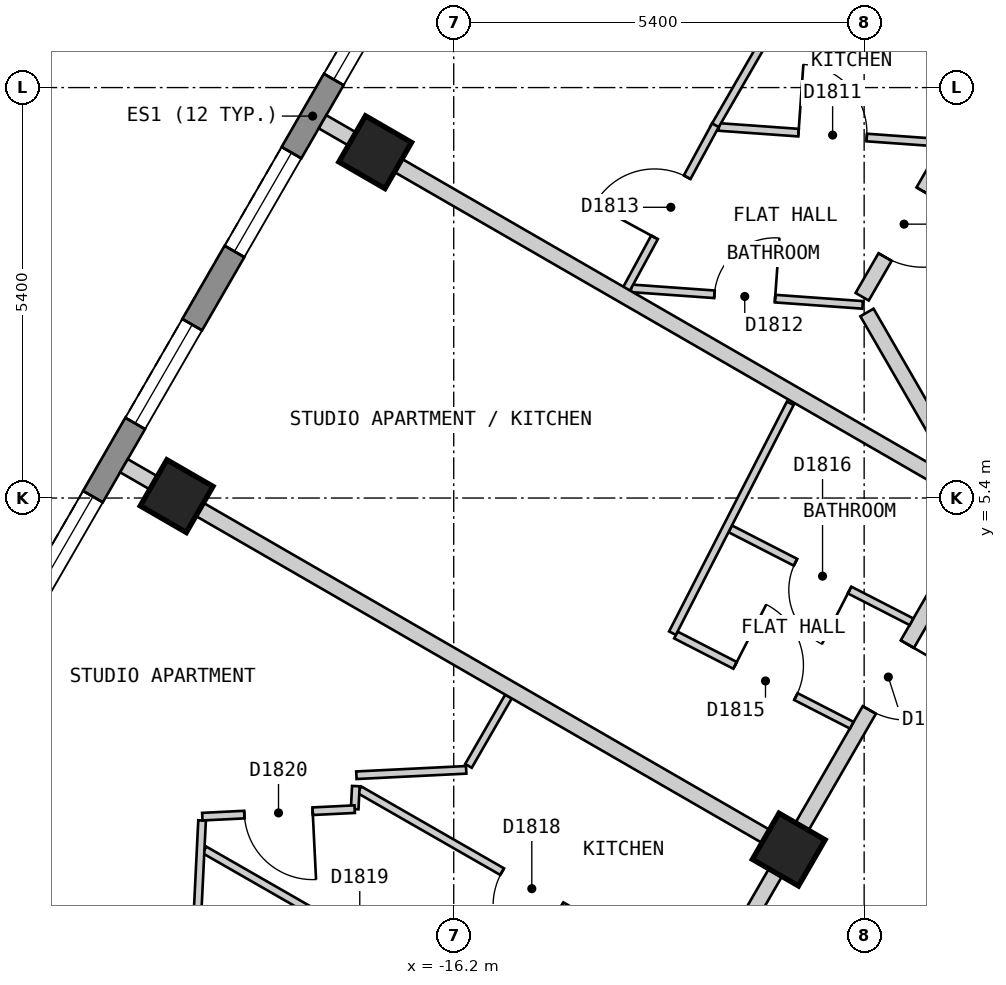
"""IFC4 building model, lengths in metres.
Left out: names, types, materials, properties, quantities, classifications, styles, units other than length and angle.
Written with IfcOpenShell. Run it as: python <this file> out.ifc"""

import sys

from ifc_helpers import new_model, si_unit, direction, frame, frame_2d, origin, origin_2d, place, context, subcontext, project, spatial, polyline, rectangle, outline, extrude, element, fill, save


model = new_model("IFC4")
c1 = context("Model", 3, precision=1e-05, world=origin(), true_north=direction((0.0, 1.0)))
c2 = subcontext(c1, "Body", "Model", "MODEL_VIEW")
j1 = project(units=[si_unit("LENGTHUNIT", "METRE"), si_unit("PLANEANGLEUNIT", "RADIAN")], contexts=[c1])
p1 = place(None, origin())
s1 = spatial("IfcSite", under=j1, at=p1, CompositionType="ELEMENT")
p2 = place(p1, origin())
s2 = spatial("IfcBuilding", under=s1, at=p2, CompositionType="ELEMENT")
p3 = place(p2, frame((0.0, 0.0, 208.8)))
s3 = spatial("IfcBuildingStorey", under=s2, at=p3, CompositionType="ELEMENT", Elevation=208.8)
for number, where, z_axis, x_axis in (
    (1, (-17.233, 9.95, 0.0), (0.0, 0.0, 1.0), (-0.5, -0.866, 0.0)),
    (2, (-19.846, 5.425, 0.0), (0.0, 0.0, 1.0), (-0.5, -0.866, 0.0)),
    (3, (-11.792, 0.775, 0.0), (0.0, 0.0, 1.0), (-0.5, -0.866, 0.0)),
):
    element("IfcColumn", number, at=place(p3, frame(where, z_axis=z_axis, x_axis=x_axis)), inside=s3, PredefinedType="COLUMN", context=c2, shape_type="SweptSolid", body=[
        extrude(rectangle(XDim=0.7, YDim=0.7, at=origin_2d()), origin(), (0.0, 0.0, 1.0), 3.0),
    ])
p4 = place(p3, frame((-12.514, 20.025, 0.0), z_axis=(0.0, 0.0, 1.0), x_axis=(-0.500003656944, -0.866023292436, 0.0)))
e4 = element("IfcWall", 4, at=p4, inside=s3, PredefinedType="SOLIDWALL", context=c2, shape_type="SweptSolid", body=[
    extrude(outline(polyline([(0.0, -0.15), (22.17, -0.15), (22.09, 0.15), (0.08, 0.15), (0.0, -0.15)])), origin(), (0.0, 0.0, 1.0), 2.7),
])
p5 = place(p4, frame((1.191, 0.0, 0.15)))
e5 = element("IfcOpeningElement", 5, at=p5, cuts=e4, PredefinedType="OPENING", context=c2, shape_type="SweptSolid", body=[
    extrude(rectangle(XDim=1.5, YDim=2.1, at=frame_2d((0.75, 1.05))), frame((0.0, 0.16, 0.0), z_axis=(0.0, -1.0, 0.0), x_axis=(1.0, 0.0, 0.0)), (0.0, 0.0, 1.0), 0.32),
])
p6 = place(p4, frame((3.804, 0.0, 0.15)))
e6 = element("IfcOpeningElement", 6, at=p6, cuts=e4, PredefinedType="OPENING", context=c2, shape_type="SweptSolid", body=[
    extrude(rectangle(XDim=1.5, YDim=2.1, at=frame_2d((0.75, 1.05))), frame((0.0, 0.16, 0.0), z_axis=(0.0, -1.0, 0.0), x_axis=(1.0, 0.0, 0.0)), (0.0, 0.0, 1.0), 0.32),
])
p7 = place(p4, frame((6.416, 0.0, 0.15)))
e7 = element("IfcOpeningElement", 7, at=p7, cuts=e4, PredefinedType="OPENING", context=c2, shape_type="SweptSolid", body=[
    extrude(rectangle(XDim=1.5, YDim=2.1, at=frame_2d((0.75, 1.05))), frame((0.0, 0.16, 0.0), z_axis=(0.0, -1.0, 0.0), x_axis=(1.0, 0.0, 0.0)), (0.0, 0.0, 1.0), 0.32),
])
p8 = place(p4, frame((9.029, 0.0, 0.15)))
e8 = element("IfcOpeningElement", 8, at=p8, cuts=e4, PredefinedType="OPENING", context=c2, shape_type="SweptSolid", body=[
    extrude(rectangle(XDim=1.5, YDim=2.1, at=frame_2d((0.75, 1.05))), frame((0.0, 0.16, 0.0), z_axis=(0.0, -1.0, 0.0), x_axis=(1.0, 0.0, 0.0)), (0.0, 0.0, 1.0), 0.32),
])
p9 = place(p4, frame((11.641, 0.0, 0.15)))
e9 = element("IfcOpeningElement", 9, at=p9, cuts=e4, PredefinedType="OPENING", context=c2, shape_type="SweptSolid", body=[
    extrude(rectangle(XDim=1.5, YDim=2.1, at=frame_2d((0.75, 1.05))), frame((0.0, 0.16, 0.0), z_axis=(0.0, -1.0, 0.0), x_axis=(1.0, 0.0, 0.0)), (0.0, 0.0, 1.0), 0.32),
])
p10 = place(p4, frame((14.254, 0.0, 0.15)))
e10 = element("IfcOpeningElement", 10, at=p10, cuts=e4, PredefinedType="OPENING", context=c2, shape_type="SweptSolid", body=[
    extrude(rectangle(XDim=1.5, YDim=2.1, at=frame_2d((0.75, 1.05))), frame((0.0, 0.16, 0.0), z_axis=(0.0, -1.0, 0.0), x_axis=(1.0, 0.0, 0.0)), (0.0, 0.0, 1.0), 0.32),
])
p11 = place(p4, frame((16.866, 0.0, 0.15)))
e11 = element("IfcOpeningElement", 11, at=p11, cuts=e4, PredefinedType="OPENING", context=c2, shape_type="SweptSolid", body=[
    extrude(rectangle(XDim=1.5, YDim=2.1, at=frame_2d((0.75, 1.05))), frame((0.0, 0.16, 0.0), z_axis=(0.0, -1.0, 0.0), x_axis=(1.0, 0.0, 0.0)), (0.0, 0.0, 1.0), 0.32),
])
p12 = place(p4, frame((19.479, 0.0, 0.15)))
e12 = element("IfcOpeningElement", 12, at=p12, cuts=e4, PredefinedType="OPENING", context=c2, shape_type="SweptSolid", body=[
    extrude(rectangle(XDim=1.5, YDim=2.1, at=frame_2d((0.75, 1.05))), frame((0.0, 0.16, 0.0), z_axis=(0.0, -1.0, 0.0), x_axis=(1.0, 0.0, 0.0)), (0.0, 0.0, 1.0), 0.32),
])
p13 = place(p3, frame((-10.763, 7.841, 0.0), z_axis=(0.0, 0.0, 1.0), x_axis=(0.499980792466, -0.866036492975, 0.0)))
e13 = element("IfcWall", 13, at=p13, inside=s3, PredefinedType="PARTITIONING", context=c2, shape_type="SweptSolid", body=[
    extrude(rectangle(XDim=2.618, YDim=0.2, at=frame_2d((1.309, 0.0))), origin(), (0.0, 0.0, 1.0), 2.7),
])
p14 = place(p3, frame((-10.623, -1.6, 0.0), z_axis=(0.0, 0.0, 1.0), x_axis=(0.500040865889, 0.866001808567, 0.0)))
e14 = element("IfcWall", 14, at=p14, inside=s3, PredefinedType="PARTITIONING", context=c2, shape_type="SweptSolid", body=[
    extrude(rectangle(XDim=5.31, YDim=0.2, at=frame_2d((2.655, 0.0))), origin(), (0.0, 0.0, 1.0), 2.7),
])
p15 = place(p14, frame((2.205, 0.0, 0.0)))
e15 = element("IfcOpeningElement", 15, at=p15, cuts=e14, PredefinedType="OPENING", context=c2, shape_type="SweptSolid", body=[
    extrude(rectangle(XDim=0.9, YDim=2.1, at=frame_2d((0.45, 1.05))), frame((0.0, 0.11, 0.0), z_axis=(0.0, -1.0, 0.0), x_axis=(1.0, 0.0, 0.0)), (0.0, 0.0, 1.0), 0.22),
])
p16 = place(p3, frame((-13.106, -1.5, 0.0), z_axis=(0.0, 0.0, 1.0), x_axis=(0.500025705601, 0.86601056214, 0.0)))
e16 = element("IfcWall", 16, at=p16, inside=s3, PredefinedType="PARTITIONING", context=c2, shape_type="SweptSolid", body=[
    extrude(rectangle(XDim=7.735, YDim=0.2, at=frame_2d((3.868, 0.0))), origin(), (0.0, 0.0, 1.0), 2.7),
])
p17 = place(p16, frame((4.748, 0.0, 0.0)))
e17 = element("IfcOpeningElement", 17, at=p17, cuts=e16, PredefinedType="OPENING", context=c2, shape_type="SweptSolid", body=[
    extrude(rectangle(XDim=1.0, YDim=2.1, at=frame_2d((0.5, 1.05))), frame((0.0, 0.11, 0.0), z_axis=(0.0, -1.0, 0.0), x_axis=(1.0, 0.0, 0.0)), (0.0, 0.0, 1.0), 0.22),
])
p18 = place(p16, frame((0.03, 0.0, 0.0)))
e18 = element("IfcOpeningElement", 18, at=p18, cuts=e16, PredefinedType="OPENING", context=c2, shape_type="SweptSolid", body=[
    extrude(rectangle(XDim=0.8, YDim=2.1, at=frame_2d((0.4, 1.05))), frame((0.0, 0.11, 0.0), z_axis=(0.0, -1.0, 0.0), x_axis=(1.0, 0.0, 0.0)), (0.0, 0.0, 1.0), 0.22),
])
p19 = place(p3, frame((-10.826, 8.048, 0.0), z_axis=(0.0, 0.0, 1.0), x_axis=(0.499953104851, 0.866052477019, 0.0)))
e19 = element("IfcWall", 19, at=p19, inside=s3, PredefinedType="PARTITIONING", context=c2, shape_type="SweptSolid", body=[
    extrude(rectangle(XDim=7.91, YDim=0.2, at=frame_2d((3.955, 0.0))), origin(), (0.0, 0.0, 1.0), 2.7),
])
p20 = place(p19, frame((0.603, 0.0, 0.0)))
e20 = element("IfcOpeningElement", 20, at=p20, cuts=e19, PredefinedType="OPENING", context=c2, shape_type="SweptSolid", body=[
    extrude(rectangle(XDim=1.0, YDim=2.1, at=frame_2d((0.5, 1.05))), frame((0.0, 0.11, 0.0), z_axis=(0.0, -1.0, 0.0), x_axis=(1.0, 0.0, 0.0)), (0.0, 0.0, 1.0), 0.22),
])
p21 = place(p3, frame((-12.562, 4.995, 0.0), z_axis=(0.0, 0.0, 1.0), x_axis=(0.889807979554, -0.456335139478, 0.0)))
e21 = element("IfcWall", 21, at=p21, inside=s3, PredefinedType="PARTITIONING", context=c2, shape_type="SweptSolid", body=[
    extrude(rectangle(XDim=2.68, YDim=0.1, at=frame_2d((1.34, 0.0))), origin(), (0.0, 0.0, 1.0), 2.7),
])
p22 = place(p21, frame((0.965, 0.0, 0.0)))
e22 = element("IfcOpeningElement", 22, at=p22, cuts=e21, PredefinedType="OPENING", context=c2, shape_type="SweptSolid", body=[
    extrude(rectangle(XDim=0.8, YDim=2.1, at=frame_2d((0.4, 1.05))), frame((0.0, 0.06, 0.0), z_axis=(0.0, -1.0, 0.0), x_axis=(1.0, 0.0, 0.0)), (0.0, 0.0, 1.0), 0.12),
])
p23 = place(p3, frame((-13.277, 3.598, 0.0), z_axis=(0.0, 0.0, 1.0), x_axis=(0.889780322893, -0.456389063182, 0.0)))
e23 = element("IfcWall", 23, at=p23, inside=s3, PredefinedType="PARTITIONING", context=c2, shape_type="SweptSolid", body=[
    extrude(rectangle(XDim=2.601, YDim=0.1, at=frame_2d((1.3, 0.0))), origin(), (0.0, 0.0, 1.0), 2.7),
])
p24 = place(p23, frame((0.875, 0.0, 0.0)))
e24 = element("IfcOpeningElement", 24, at=p24, cuts=e23, PredefinedType="OPENING", context=c2, shape_type="SweptSolid", body=[
    extrude(rectangle(XDim=0.9, YDim=2.1, at=frame_2d((0.45, 1.05))), frame((0.0, 0.06, 0.0), z_axis=(0.0, -1.0, 0.0), x_axis=(1.0, 0.0, 0.0)), (0.0, 0.0, 1.0), 0.12),
])
p25 = place(p3, frame((-17.441, 1.562, 0.0), z_axis=(0.0, 0.0, 1.0), x_axis=(0.867419073464, -0.497578286293, 0.0)))
e25 = element("IfcWall", 25, at=p25, inside=s3, PredefinedType="PARTITIONING", context=c2, shape_type="SweptSolid", body=[
    extrude(rectangle(XDim=5.185, YDim=0.1, at=frame_2d((2.593, 0.0))), origin(), (0.0, 0.0, 1.0), 2.7),
])
p26 = place(p25, frame((2.165, 0.0, 0.0)))
e26 = element("IfcOpeningElement", 26, at=p26, cuts=e25, PredefinedType="OPENING", context=c2, shape_type="SweptSolid", body=[
    extrude(rectangle(XDim=0.9, YDim=2.1, at=frame_2d((0.45, 1.05))), frame((0.0, 0.06, 0.0), z_axis=(0.0, -1.0, 0.0), x_axis=(1.0, 0.0, 0.0)), (0.0, 0.0, 1.0), 0.12),
])
p27 = place(p3, frame((-19.48, 0.771, 0.0), z_axis=(0.0, 0.0, 1.0), x_axis=(0.86748552317, -0.497462427817, 0.0)))
e27 = element("IfcWall", 27, at=p27, inside=s3, PredefinedType="PARTITIONING", context=c2, shape_type="SweptSolid", body=[
    extrude(rectangle(XDim=4.567, YDim=0.1, at=frame_2d((2.284, 0.0))), origin(), (0.0, 0.0, 1.0), 2.7),
])
p28 = place(p27, frame((1.956, 0.0, 0.0)))
e28 = element("IfcOpeningElement", 28, at=p28, cuts=e27, PredefinedType="OPENING", context=c2, shape_type="SweptSolid", body=[
    extrude(rectangle(XDim=0.8, YDim=2.1, at=frame_2d((0.4, 1.05))), frame((0.0, 0.06, 0.0), z_axis=(0.0, -1.0, 0.0), x_axis=(1.0, 0.0, 0.0)), (0.0, 0.0, 1.0), 0.12),
])
p29 = place(p3, frame((-13.866, 8.159, 0.0), z_axis=(0.0, 0.0, 1.0), x_axis=(0.9974481372, -0.071394772886, 0.0)))
e29 = element("IfcWall", 29, at=p29, inside=s3, PredefinedType="PARTITIONING", context=c2, shape_type="SweptSolid", body=[
    extrude(rectangle(XDim=3.054, YDim=0.1, at=frame_2d((1.527, 0.0))), origin(), (0.0, 0.0, 1.0), 2.7),
])
p30 = place(p29, frame((1.099, 0.0, 0.0)))
e30 = element("IfcOpeningElement", 30, at=p30, cuts=e29, PredefinedType="OPENING", context=c2, shape_type="SweptSolid", body=[
    extrude(rectangle(XDim=0.8, YDim=2.1, at=frame_2d((0.4, 1.05))), frame((0.0, 0.06, 0.0), z_axis=(0.0, -1.0, 0.0), x_axis=(1.0, 0.0, 0.0)), (0.0, 0.0, 1.0), 0.12),
])
p31 = place(p3, frame((-12.712, 10.282, 0.0), z_axis=(0.0, 0.0, 1.0), x_axis=(0.997457858552, -0.071258826911, 0.0)))
e31 = element("IfcWall", 31, at=p31, inside=s3, PredefinedType="PARTITIONING", context=c2, shape_type="SweptSolid", body=[
    extrude(rectangle(XDim=2.947, YDim=0.1, at=frame_2d((1.473, 0.0))), origin(), (0.0, 0.0, 1.0), 2.7),
])
p32 = place(p31, frame((1.051, 0.0, 0.0)))
e32 = element("IfcOpeningElement", 32, at=p32, cuts=e31, PredefinedType="OPENING", context=c2, shape_type="SweptSolid", body=[
    extrude(rectangle(XDim=0.9, YDim=2.1, at=frame_2d((0.45, 1.05))), frame((0.0, 0.06, 0.0), z_axis=(0.0, -1.0, 0.0), x_axis=(1.0, 0.0, 0.0)), (0.0, 0.0, 1.0), 0.12),
])
p33 = place(p3, frame((-16.006, 1.876, 0.0), z_axis=(0.0, 0.0, 1.0), x_axis=(0.499949632511, 0.866054481515, 0.0)))
e33 = element("IfcWall", 33, at=p33, inside=s3, PredefinedType="PARTITIONING", context=c2, shape_type="SweptSolid", body=[
    extrude(rectangle(XDim=1.054, YDim=0.1, at=frame_2d((0.527, 0.0))), origin(), (0.0, 0.0, 1.0), 2.7),
])
p34 = place(p3, frame((-12.778, 10.268, 0.0), z_axis=(0.0, 0.0, 1.0), x_axis=(0.500084799062, 0.865976439487, 0.0)))
e34 = element("IfcWall", 34, at=p34, inside=s3, PredefinedType="PARTITIONING", context=c2, shape_type="SweptSolid", body=[
    extrude(rectangle(XDim=2.722, YDim=0.1, at=frame_2d((1.361, 0.0))), origin(), (0.0, 0.0, 1.0), 2.7),
])
p35 = place(p3, frame((-13.93, 8.145, 0.0), z_axis=(0.0, 0.0, 1.0), x_axis=(0.477194887681, 0.878797496111, 0.0)))
e35 = element("IfcWall", 35, at=p35, inside=s3, PredefinedType="PARTITIONING", context=c2, shape_type="SweptSolid", body=[
    extrude(rectangle(XDim=2.458, YDim=0.1, at=frame_2d((1.229, 0.0))), origin(), (0.0, 0.0, 1.0), 2.7),
])
p36 = place(p35, frame((0.779, 0.0, 0.0)))
e36 = element("IfcOpeningElement", 36, at=p36, cuts=e35, PredefinedType="OPENING", context=c2, shape_type="SweptSolid", body=[
    extrude(rectangle(XDim=0.9, YDim=2.1, at=frame_2d((0.45, 1.05))), frame((0.0, 0.06, 0.0), z_axis=(0.0, -1.0, 0.0), x_axis=(1.0, 0.0, 0.0)), (0.0, 0.0, 1.0), 0.12),
])
p37 = place(p3, frame((-13.322, 3.622, 0.0), z_axis=(0.0, 0.0, 1.0), x_axis=(0.456157649007, 0.889898982611, 0.0)))
e37 = element("IfcWall", 37, at=p37, inside=s3, PredefinedType="PARTITIONING", context=c2, shape_type="SweptSolid", body=[
    extrude(rectangle(XDim=3.398, YDim=0.1, at=frame_2d((1.699, 0.0))), origin(), (0.0, 0.0, 1.0), 2.7),
])
p38 = place(p3, frame((-17.503, 1.307, 0.0), z_axis=(0.0, 0.0, 1.0), x_axis=(0.049055201451, 0.99879606888, 0.0)))
e38 = element("IfcWall", 38, at=p38, inside=s3, PredefinedType="PARTITIONING", context=c2, shape_type="SweptSolid", body=[
    extrude(rectangle(XDim=0.303, YDim=0.1, at=frame_2d((0.152, 0.0))), origin(), (0.0, 0.0, 1.0), 2.7),
])
p39 = place(p3, frame((-19.641, -1.5, 0.0), z_axis=(0.0, 0.0, 1.0), x_axis=(0.048898906005, 0.998803732968, 0.0)))
e39 = element("IfcWall", 39, at=p39, inside=s3, PredefinedType="PARTITIONING", context=c2, shape_type="SweptSolid", body=[
    extrude(rectangle(XDim=2.661, YDim=0.1, at=frame_2d((1.331, 0.0))), origin(), (0.0, 0.0, 1.0), 2.7),
])
p40 = place(p3, frame((-19.508, 1.208, 0.0), z_axis=(0.0, 0.0, 1.0), x_axis=(0.998786372978, 0.04925221978, 0.0)))
e40 = element("IfcWall", 40, at=p40, inside=s3, PredefinedType="PARTITIONING", context=c2, shape_type="SweptSolid", body=[
    extrude(rectangle(XDim=2.008, YDim=0.1, at=frame_2d((1.004, 0.0))), origin(), (0.0, 0.0, 1.0), 2.7),
])
p41 = place(p40, frame((0.554, 0.0, 0.0)))
e41 = element("IfcOpeningElement", 41, at=p41, cuts=e40, PredefinedType="OPENING", context=c2, shape_type="SweptSolid", body=[
    extrude(rectangle(XDim=0.9, YDim=2.1, at=frame_2d((0.45, 1.05))), frame((0.0, 0.06, 0.0), z_axis=(0.0, -1.0, 0.0), x_axis=(1.0, 0.0, 0.0)), (0.0, 0.0, 1.0), 0.12),
])
p42 = place(p3, frame((-17.481, 1.753, 0.0), z_axis=(0.0, 0.0, 1.0), x_axis=(0.998793651238, 0.049104401505, 0.0)))
e42 = element("IfcWall", 42, at=p42, inside=s3, PredefinedType="PARTITIONING", context=c2, shape_type="SweptSolid", body=[
    extrude(rectangle(XDim=1.447, YDim=0.1, at=frame_2d((0.723, 0.0))), origin(), (0.0, 0.0, 1.0), 2.7),
])
p43 = place(p3, frame((-20.539, 5.825, 0.0), z_axis=(0.0, 0.0, 1.0), x_axis=(0.866028187226, -0.499995178908, 0.0)))
e43 = element("IfcWall", 43, at=p43, inside=s3, PredefinedType="PARTITIONING", context=c2, shape_type="SweptSolid", body=[
    extrude(rectangle(XDim=9.996, YDim=0.2, at=frame_2d((4.998, 0.0))), origin(), (0.0, 0.0, 1.0), 2.7),
])
p44 = place(p3, frame((-17.926, 10.35, 0.0), z_axis=(0.0, 0.0, 1.0), x_axis=(0.866018411306, -0.500012111133, 0.0)))
e44 = element("IfcWall", 44, at=p44, inside=s3, PredefinedType="PARTITIONING", context=c2, shape_type="SweptSolid", body=[
    extrude(rectangle(XDim=9.898, YDim=0.2, at=frame_2d((4.949, 0.0))), origin(), (0.0, 0.0, 1.0), 2.7),
])
p45 = place(p3, frame((-15.314, 14.875, 0.0), z_axis=(0.0, 0.0, 1.0), x_axis=(0.866001485781, -0.500041424909, 0.0)))
e45 = element("IfcWall", 45, at=p45, inside=s3, PredefinedType="PARTITIONING", context=c2, shape_type="SweptSolid", body=[
    extrude(rectangle(XDim=7.2, YDim=0.2, at=frame_2d((3.6, 0.0))), origin(), (0.0, 0.0, 1.0), 2.7),
])
p46 = place(p8, origin())
e46 = element("IfcWindow", 46, at=p46, inside=s3, PartitioningType="SINGLE_PANEL", PredefinedType="WINDOW", context=c2, shape_type="SweptSolid", body=[
    extrude(rectangle(XDim=1.5, YDim=2.1, at=frame_2d((0.75, 1.05))), frame((0.0, 0.03, 0.0), z_axis=(0.0, -1.0, 0.0), x_axis=(1.0, 0.0, 0.0)), (0.0, 0.0, 1.0), 0.06),
])
fill(e8, e46)
p47 = place(p9, origin())
e47 = element("IfcWindow", 47, at=p47, inside=s3, PartitioningType="SINGLE_PANEL", PredefinedType="WINDOW", context=c2, shape_type="SweptSolid", body=[
    extrude(rectangle(XDim=1.5, YDim=2.1, at=frame_2d((0.75, 1.05))), frame((0.0, 0.03, 0.0), z_axis=(0.0, -1.0, 0.0), x_axis=(1.0, 0.0, 0.0)), (0.0, 0.0, 1.0), 0.06),
])
fill(e9, e47)
p48 = place(p10, origin())
e48 = element("IfcWindow", 48, at=p48, inside=s3, PartitioningType="SINGLE_PANEL", PredefinedType="WINDOW", context=c2, shape_type="SweptSolid", body=[
    extrude(rectangle(XDim=1.5, YDim=2.1, at=frame_2d((0.75, 1.05))), frame((0.0, 0.03, 0.0), z_axis=(0.0, -1.0, 0.0), x_axis=(1.0, 0.0, 0.0)), (0.0, 0.0, 1.0), 0.06),
])
fill(e10, e48)
p49 = place(p11, origin())
e49 = element("IfcWindow", 49, at=p49, inside=s3, PartitioningType="SINGLE_PANEL", PredefinedType="WINDOW", context=c2, shape_type="SweptSolid", body=[
    extrude(rectangle(XDim=1.5, YDim=2.1, at=frame_2d((0.75, 1.05))), frame((0.0, 0.03, 0.0), z_axis=(0.0, -1.0, 0.0), x_axis=(1.0, 0.0, 0.0)), (0.0, 0.0, 1.0), 0.06),
])
fill(e11, e49)
p50 = place(p20, origin())
e50 = element("IfcDoor", 50, at=p50, inside=s3, OperationType="SINGLE_SWING_RIGHT", PredefinedType="DOOR", context=c2, shape_type="SweptSolid", body=[
    extrude(rectangle(XDim=1.0, YDim=2.1, at=frame_2d((0.5, 1.05))), frame((0.0, 0.025, 0.0), z_axis=(0.0, -1.0, 0.0), x_axis=(1.0, 0.0, 0.0)), (0.0, 0.0, 1.0), 0.05),
])
fill(e20, e50)
p51 = place(p32, origin())
e51 = element("IfcDoor", 51, at=p51, inside=s3, OperationType="SINGLE_SWING_LEFT", PredefinedType="DOOR", context=c2, shape_type="SweptSolid", body=[
    extrude(rectangle(XDim=0.9, YDim=2.1, at=frame_2d((0.45, 1.05))), frame((0.0, 0.025, 0.0), z_axis=(0.0, -1.0, 0.0), x_axis=(1.0, 0.0, 0.0)), (0.0, 0.0, 1.0), 0.05),
])
fill(e32, e51)
p52 = place(p30, origin())
e52 = element("IfcDoor", 52, at=p52, inside=s3, OperationType="SINGLE_SWING_RIGHT", PredefinedType="DOOR", context=c2, shape_type="SweptSolid", body=[
    extrude(rectangle(XDim=0.8, YDim=2.1, at=frame_2d((0.4, 1.05))), frame((0.0, 0.025, 0.0), z_axis=(0.0, -1.0, 0.0), x_axis=(1.0, 0.0, 0.0)), (0.0, 0.0, 1.0), 0.05),
])
fill(e30, e52)
p53 = place(p36, origin())
e53 = element("IfcDoor", 53, at=p53, inside=s3, OperationType="SINGLE_SWING_LEFT", PredefinedType="DOOR", context=c2, shape_type="SweptSolid", body=[
    extrude(rectangle(XDim=0.9, YDim=2.1, at=frame_2d((0.45, 1.05))), frame((0.0, 0.025, 0.0), z_axis=(0.0, -1.0, 0.0), x_axis=(1.0, 0.0, 0.0)), (0.0, 0.0, 1.0), 0.05),
])
fill(e36, e53)
p54 = place(p17, origin())
e54 = element("IfcDoor", 54, at=p54, inside=s3, OperationType="SINGLE_SWING_RIGHT", PredefinedType="DOOR", context=c2, shape_type="SweptSolid", body=[
    extrude(rectangle(XDim=1.0, YDim=2.1, at=frame_2d((0.5, 1.05))), frame((0.0, 0.025, 0.0), z_axis=(0.0, -1.0, 0.0), x_axis=(1.0, 0.0, 0.0)), (0.0, 0.0, 1.0), 0.05),
])
fill(e17, e54)
p55 = place(p24, origin())
e55 = element("IfcDoor", 55, at=p55, inside=s3, OperationType="SINGLE_SWING_LEFT", PredefinedType="DOOR", context=c2, shape_type="SweptSolid", body=[
    extrude(rectangle(XDim=0.9, YDim=2.1, at=frame_2d((0.45, 1.05))), frame((0.0, 0.025, 0.0), z_axis=(0.0, -1.0, 0.0), x_axis=(1.0, 0.0, 0.0)), (0.0, 0.0, 1.0), 0.05),
])
fill(e24, e55)
p56 = place(p22, origin())
e56 = element("IfcDoor", 56, at=p56, inside=s3, OperationType="SINGLE_SWING_RIGHT", PredefinedType="DOOR", context=c2, shape_type="SweptSolid", body=[
    extrude(rectangle(XDim=0.8, YDim=2.1, at=frame_2d((0.4, 1.05))), frame((0.0, 0.025, 0.0), z_axis=(0.0, -1.0, 0.0), x_axis=(1.0, 0.0, 0.0)), (0.0, 0.0, 1.0), 0.05),
])
fill(e22, e56)
p57 = place(p26, origin())
e57 = element("IfcDoor", 57, at=p57, inside=s3, OperationType="SINGLE_SWING_RIGHT", PredefinedType="DOOR", context=c2, shape_type="SweptSolid", body=[
    extrude(rectangle(XDim=0.9, YDim=2.1, at=frame_2d((0.45, 1.05))), frame((0.0, 0.025, 0.0), z_axis=(0.0, -1.0, 0.0), x_axis=(1.0, 0.0, 0.0)), (0.0, 0.0, 1.0), 0.05),
])
fill(e26, e57)
p58 = place(p41, origin())
e58 = element("IfcDoor", 58, at=p58, inside=s3, OperationType="SINGLE_SWING_RIGHT", PredefinedType="DOOR", context=c2, shape_type="SweptSolid", body=[
    extrude(rectangle(XDim=0.9, YDim=2.1, at=frame_2d((0.45, 1.05))), frame((0.0, 0.025, 0.0), z_axis=(0.0, -1.0, 0.0), x_axis=(1.0, 0.0, 0.0)), (0.0, 0.0, 1.0), 0.05),
])
fill(e41, e58)
save(model, sys.argv[1])
